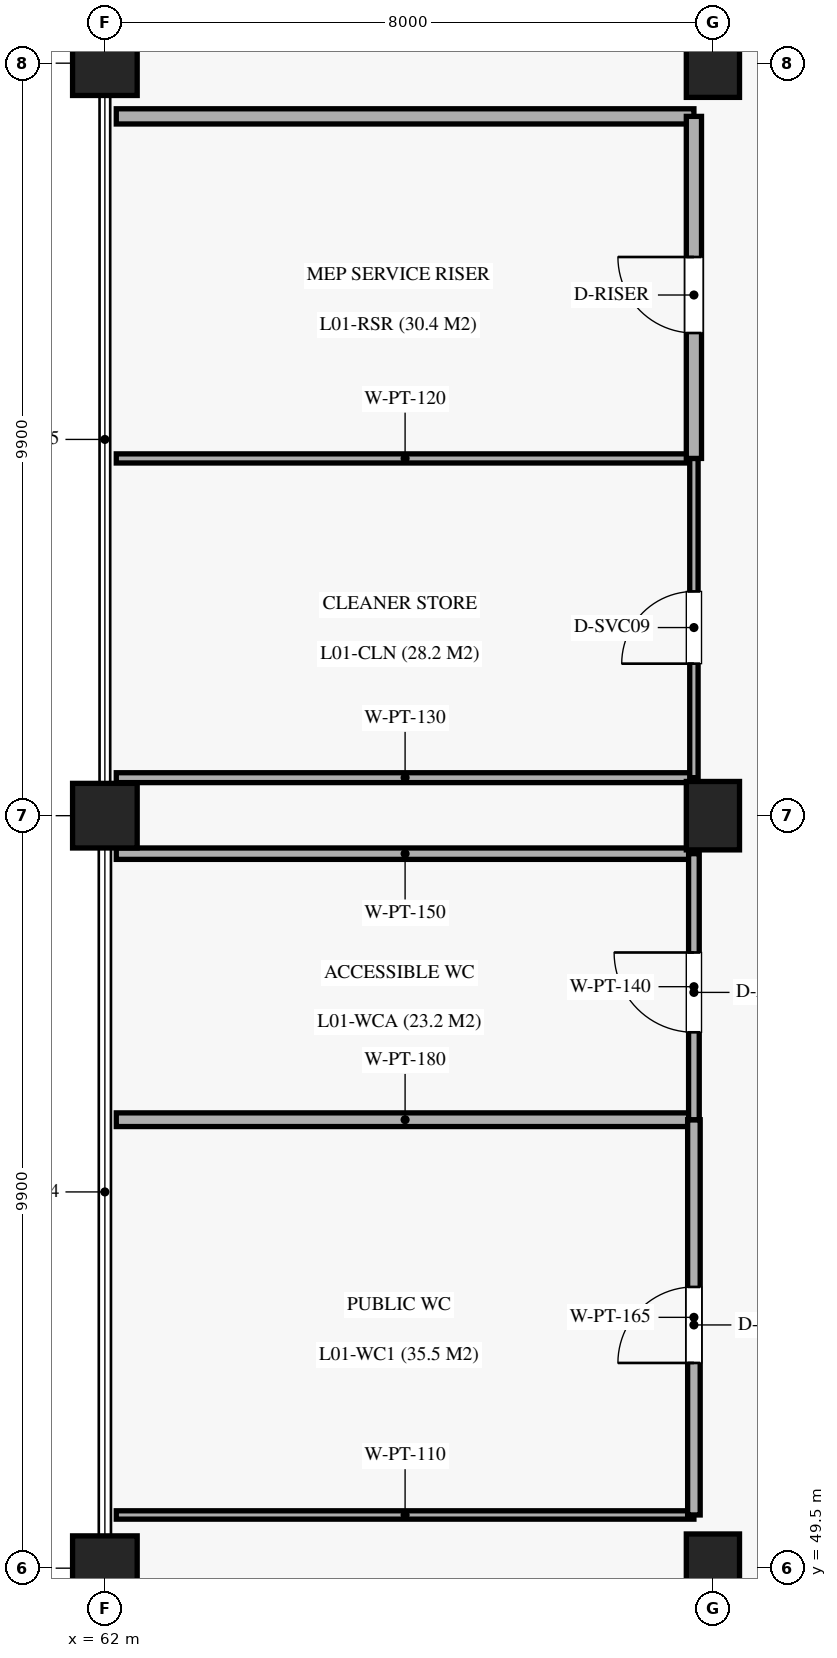
"""IFC4 building model, lengths in metres.
Left out: names, types, materials, properties, quantities, classifications, styles, units other than length and angle.
Written with IfcOpenShell. Run it as: python <this file> out.ifc"""

import sys

from ifc_helpers import new_model, si_unit, direction, frame, frame_2d, origin, origin_2d, place, context, subcontext, project, spatial, rectangle, extrude, element, fill, save


model = new_model("IFC4")
c1 = context("Model", 3, precision=1e-05, world=origin(), true_north=direction((0.0, 1.0)))
c2 = subcontext(c1, "Body", "Model", "MODEL_VIEW")
j1 = project(units=[si_unit("LENGTHUNIT", "METRE"), si_unit("PLANEANGLEUNIT", "RADIAN")], contexts=[c1])
p1 = place(None, origin())
s1 = spatial("IfcSite", under=j1, at=p1, CompositionType="ELEMENT")
p2 = place(p1, origin())
s2 = spatial("IfcBuilding", under=s1, at=p2, CompositionType="ELEMENT")
p3 = place(p2, frame((0.0, 0.0, 5.44)))
s3 = spatial("IfcBuildingStorey", under=s2, at=p3, CompositionType="ELEMENT", Elevation=5.44)
for number, where, z_axis, x_axis in (
    (1, (62.0, 49.5, 0.0), (0.0, 0.0, 1.0), (1.0, 0.0, 0.0)),
    (2, (62.0, 59.4, 0.0), (0.0, 0.0, 1.0), (1.0, 0.0, 0.0)),
    (3, (62.0, 69.3, 0.0), (0.0, 0.0, 1.0), (1.0, 0.0, 0.0)),
):
    element("IfcColumn", number, at=place(p3, frame(where, z_axis=z_axis, x_axis=x_axis)), inside=s3, PredefinedType="COLUMN", context=c2, shape_type="SweptSolid", body=[
        extrude(rectangle(XDim=0.85, YDim=0.85, at=origin_2d()), origin(), (0.0, 0.0, 1.0), 5.44),
    ])
for number, where, z_axis, x_axis in (
    (4, (70.0, 49.5, 0.0), (0.0, 0.0, 1.0), (1.0, 0.0, 0.0)),
    (5, (70.0, 59.4, 0.0), (0.0, 0.0, 1.0), (1.0, 0.0, 0.0)),
    (6, (70.0, 69.3, 0.0), (0.0, 0.0, 1.0), (1.0, 0.0, 0.0)),
):
    element("IfcColumn", number, at=place(p3, frame(where, z_axis=z_axis, x_axis=x_axis)), inside=s3, PredefinedType="COLUMN", context=c2, shape_type="SweptSolid", body=[
        extrude(rectangle(XDim=0.7, YDim=0.9, at=origin_2d()), origin(), (0.0, 0.0, 1.0), 5.44),
    ])
p4 = place(p3, frame((62.15, 50.2, 0.0), z_axis=(0.0, 0.0, 1.0), x_axis=(1.0, 0.0, 0.0)))
e7 = element("IfcWall", 7, at=p4, inside=s3, PredefinedType="PARTITIONING", context=c2, shape_type="SweptSolid", body=[
    extrude(rectangle(XDim=7.6, YDim=0.11, at=frame_2d((3.8, 0.0))), origin(), (0.0, 0.0, 1.0), 4.3),
])
p5 = place(p3, frame((62.15, 55.4, 0.0), z_axis=(0.0, 0.0, 1.0), x_axis=(1.0, 0.0, 0.0)))
e8 = element("IfcWall", 8, at=p5, inside=s3, PredefinedType="PARTITIONING", context=c2, shape_type="SweptSolid", body=[
    extrude(rectangle(XDim=7.6, YDim=0.18, at=frame_2d((3.8, 0.0))), origin(), (0.0, 0.0, 1.0), 4.3),
])
p6 = place(p3, frame((69.75, 50.2, 0.0), z_axis=(0.0, 0.0, 1.0), x_axis=(0.0, 1.0, 0.0)))
e9 = element("IfcWall", 9, at=p6, inside=s3, PredefinedType="PARTITIONING", context=c2, shape_type="SweptSolid", body=[
    extrude(rectangle(XDim=5.2, YDim=0.165, at=frame_2d((2.6, 0.0))), origin(), (0.0, 0.0, 1.0), 4.3),
])
p7 = place(p6, frame((2.0, 0.0, 0.0)))
e10 = element("IfcOpeningElement", 10, at=p7, cuts=e9, PredefinedType="OPENING", context=c2, shape_type="SweptSolid", body=[
    extrude(rectangle(XDim=1.0, YDim=2.1, at=frame_2d((0.5, 1.05))), frame((0.0, 0.093, 0.0), z_axis=(0.0, -1.0, 0.0), x_axis=(1.0, 0.0, 0.0)), (0.0, 0.0, 1.0), 0.185),
])
p8 = place(p3, frame((62.15, 58.9, 0.0), z_axis=(0.0, 0.0, 1.0), x_axis=(1.0, 0.0, 0.0)))
e11 = element("IfcWall", 11, at=p8, inside=s3, PredefinedType="PARTITIONING", context=c2, shape_type="SweptSolid", body=[
    extrude(rectangle(XDim=7.6, YDim=0.15, at=frame_2d((3.8, 0.0))), origin(), (0.0, 0.0, 1.0), 4.3),
])
p9 = place(p3, frame((69.75, 55.4, 0.0), z_axis=(0.0, 0.0, 1.0), x_axis=(0.0, 1.0, 0.0)))
e12 = element("IfcWall", 12, at=p9, inside=s3, PredefinedType="PARTITIONING", context=c2, shape_type="SweptSolid", body=[
    extrude(rectangle(XDim=3.5, YDim=0.14, at=frame_2d((1.75, 0.0))), origin(), (0.0, 0.0, 1.0), 4.3),
])
p10 = place(p9, frame((1.15, 0.0, 0.0)))
e13 = element("IfcOpeningElement", 13, at=p10, cuts=e12, PredefinedType="OPENING", context=c2, shape_type="SweptSolid", body=[
    extrude(rectangle(XDim=1.05, YDim=2.15, at=frame_2d((0.525, 1.075))), frame((0.0, 0.08, 0.0), z_axis=(0.0, -1.0, 0.0), x_axis=(1.0, 0.0, 0.0)), (0.0, 0.0, 1.0), 0.16),
])
p11 = place(p3, frame((62.15, 59.9, 0.0), z_axis=(0.0, 0.0, 1.0), x_axis=(1.0, 0.0, 0.0)))
e14 = element("IfcWall", 14, at=p11, inside=s3, PredefinedType="PARTITIONING", context=c2, shape_type="SweptSolid", body=[
    extrude(rectangle(XDim=7.6, YDim=0.13, at=frame_2d((3.8, 0.0))), origin(), (0.0, 0.0, 1.0), 4.3),
])
p12 = place(p3, frame((62.15, 64.1, 0.0), z_axis=(0.0, 0.0, 1.0), x_axis=(1.0, 0.0, 0.0)))
e15 = element("IfcWall", 15, at=p12, inside=s3, PredefinedType="PARTITIONING", context=c2, shape_type="SweptSolid", body=[
    extrude(rectangle(XDim=7.6, YDim=0.12, at=frame_2d((3.8, 0.0))), origin(), (0.0, 0.0, 1.0), 4.3),
])
p13 = place(p3, frame((69.75, 59.9, 0.0), z_axis=(0.0, 0.0, 1.0), x_axis=(0.0, 1.0, 0.0)))
e16 = element("IfcWall", 16, at=p13, inside=s3, PredefinedType="PARTITIONING", context=c2, shape_type="SweptSolid", body=[
    extrude(rectangle(XDim=4.2, YDim=0.11, at=frame_2d((2.1, 0.0))), origin(), (0.0, 0.0, 1.0), 4.3),
])
p14 = place(p13, frame((1.5, 0.0, 0.0)))
e17 = element("IfcOpeningElement", 17, at=p14, cuts=e16, PredefinedType="OPENING", context=c2, shape_type="SweptSolid", body=[
    extrude(rectangle(XDim=0.95, YDim=2.1, at=frame_2d((0.475, 1.05))), frame((0.0, 0.065, 0.0), z_axis=(0.0, -1.0, 0.0), x_axis=(1.0, 0.0, 0.0)), (0.0, 0.0, 1.0), 0.13),
])
p15 = place(p3, frame((62.15, 68.6, 0.0), z_axis=(0.0, 0.0, 1.0), x_axis=(1.0, 0.0, 0.0)))
e18 = element("IfcWall", 18, at=p15, inside=s3, PredefinedType="SOLIDWALL", context=c2, shape_type="SweptSolid", body=[
    extrude(rectangle(XDim=7.6, YDim=0.2, at=frame_2d((3.8, 0.0))), origin(), (0.0, 0.0, 1.0), 4.3),
])
p16 = place(p3, frame((69.75, 64.1, 0.0), z_axis=(0.0, 0.0, 1.0), x_axis=(0.0, 1.0, 0.0)))
e19 = element("IfcWall", 19, at=p16, inside=s3, PredefinedType="SOLIDWALL", context=c2, shape_type="SweptSolid", body=[
    extrude(rectangle(XDim=4.5, YDim=0.2, at=frame_2d((2.25, 0.0))), origin(), (0.0, 0.0, 1.0), 4.3),
])
p17 = place(p16, frame((1.65, 0.0, 0.0)))
e20 = element("IfcOpeningElement", 20, at=p17, cuts=e19, PredefinedType="OPENING", context=c2, shape_type="SweptSolid", body=[
    extrude(rectangle(XDim=1.0, YDim=2.15, at=frame_2d((0.5, 1.075))), frame((0.0, 0.11, 0.0), z_axis=(0.0, -1.0, 0.0), x_axis=(1.0, 0.0, 0.0)), (0.0, 0.0, 1.0), 0.22),
])
p18 = place(p7, origin())
e21 = element("IfcDoor", 21, at=p18, inside=s3, OperationType="SINGLE_SWING_LEFT", PredefinedType="DOOR", context=c2, shape_type="SweptSolid", body=[
    extrude(rectangle(XDim=1.0, YDim=2.1, at=frame_2d((0.5, 1.05))), frame((0.0, 0.025, 0.0), z_axis=(0.0, -1.0, 0.0), x_axis=(1.0, 0.0, 0.0)), (0.0, 0.0, 1.0), 0.05),
])
fill(e10, e21)
p19 = place(p10, origin())
e22 = element("IfcDoor", 22, at=p19, inside=s3, OperationType="SINGLE_SWING_RIGHT", PredefinedType="DOOR", context=c2, shape_type="SweptSolid", body=[
    extrude(rectangle(XDim=1.05, YDim=2.15, at=frame_2d((0.525, 1.075))), frame((0.0, 0.025, 0.0), z_axis=(0.0, -1.0, 0.0), x_axis=(1.0, 0.0, 0.0)), (0.0, 0.0, 1.0), 0.05),
])
fill(e13, e22)
p20 = place(p14, origin())
e23 = element("IfcDoor", 23, at=p20, inside=s3, OperationType="SINGLE_SWING_LEFT", PredefinedType="DOOR", context=c2, shape_type="SweptSolid", body=[
    extrude(rectangle(XDim=0.95, YDim=2.1, at=frame_2d((0.475, 1.05))), frame((0.0, 0.025, 0.0), z_axis=(0.0, -1.0, 0.0), x_axis=(1.0, 0.0, 0.0)), (0.0, 0.0, 1.0), 0.05),
])
fill(e17, e23)
p21 = place(p17, origin())
e24 = element("IfcDoor", 24, at=p21, inside=s3, OperationType="SINGLE_SWING_RIGHT", PredefinedType="DOOR", context=c2, shape_type="SweptSolid", body=[
    extrude(rectangle(XDim=1.0, YDim=2.15, at=frame_2d((0.5, 1.075))), frame((0.0, 0.025, 0.0), z_axis=(0.0, -1.0, 0.0), x_axis=(1.0, 0.0, 0.0)), (0.0, 0.0, 1.0), 0.05),
])
fill(e20, e24)
save(model, sys.argv[1])
